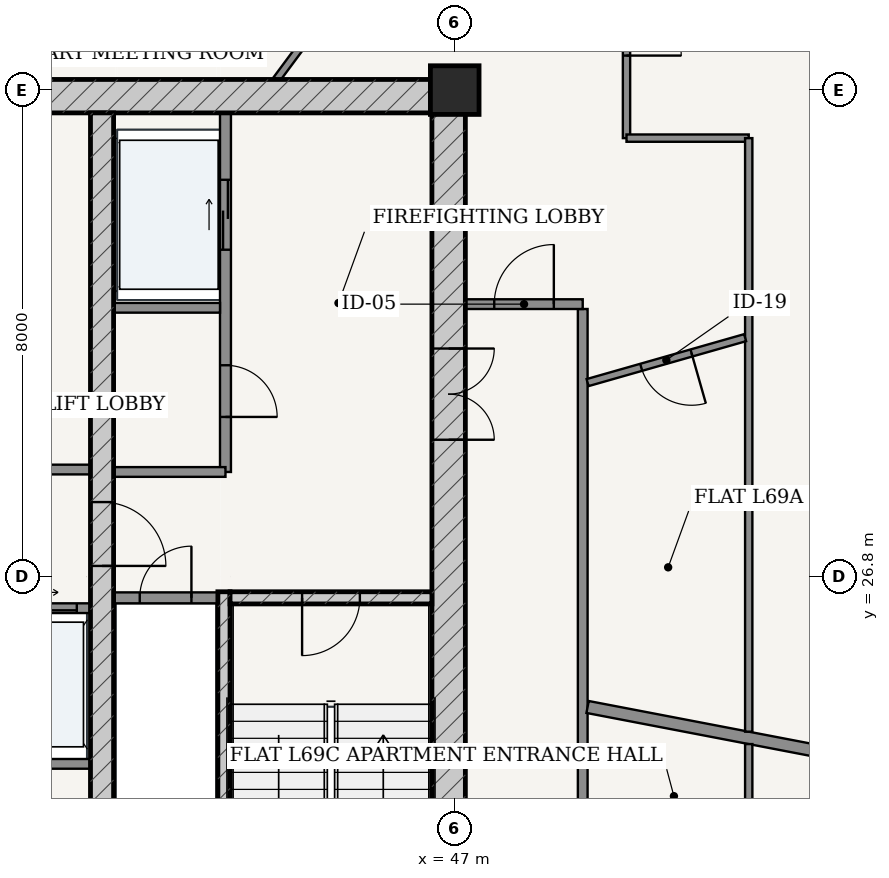
"""IFC4 building model, lengths in metres.
Left out: names, types, materials, properties, quantities, classifications, styles, units other than length and angle.
Written with IfcOpenShell. Run it as: python <this file> out.ifc"""

import sys

from ifc_helpers import new_model, si_unit, direction, frame, frame_2d, origin, origin_2d, place, context, subcontext, project, spatial, rectangle, extrude, source, transform, mapped, element, fill, save


model = new_model("IFC4")
c1 = context("Model", 3, precision=1e-05, world=origin(), true_north=direction((-0.2419218956, 0.970295726276)))
c2 = subcontext(c1, "Body", "Model", "MODEL_VIEW")
j1 = project(units=[si_unit("LENGTHUNIT", "METRE"), si_unit("PLANEANGLEUNIT", "RADIAN")], contexts=[c1])
p1 = place(None, origin())
s1 = spatial("IfcSite", under=j1, at=p1, CompositionType="ELEMENT")
p2 = place(p1, origin())
s2 = spatial("IfcBuilding", under=s1, at=p2, CompositionType="ELEMENT")
p3 = place(p2, frame((0.0, 0.0, 263.2)))
s3 = spatial("IfcBuildingStorey", under=s2, at=p3, CompositionType="ELEMENT", Elevation=263.2)
p4 = place(p3, frame((47.0, 34.8, 0.0), z_axis=(0.0, 0.0, 1.0), x_axis=(1.0, 0.0, 0.0)))
e1 = element("IfcColumn", 1, at=p4, inside=s3, PredefinedType="COLUMN", context=c2, shape_type="SweptSolid", body=[
    extrude(rectangle(XDim=0.8, YDim=0.8, at=origin_2d()), origin(), (0.0, 0.0, 1.0), 3.75),
])
p5 = place(p3, frame((28.825, 34.7, 0.0), z_axis=(0.0, 0.0, 1.0), x_axis=(1.0, 0.0, 0.0)))
e2 = element("IfcWall", 2, at=p5, inside=s3, PredefinedType="SHEAR", context=c2, shape_type="SweptSolid", body=[
    extrude(rectangle(XDim=18.35, YDim=0.55, at=frame_2d((9.175, 0.0))), origin(), (0.0, 0.0, 1.0), 3.49),
])
p6 = place(p3, frame((46.9, 19.175, 0.0), z_axis=(0.0, 0.0, 1.0), x_axis=(0.0, 1.0, 0.0)))
e3 = element("IfcWall", 3, at=p6, inside=s3, PredefinedType="SHEAR", context=c2, shape_type="SweptSolid", body=[
    extrude(rectangle(XDim=15.25, YDim=0.55, at=frame_2d((7.625, 0.0))), origin(), (0.0, 0.0, 1.0), 3.49),
])
p7 = place(p6, frame((9.875, 0.0, 0.0)))
e4 = element("IfcOpeningElement", 4, at=p7, cuts=e3, PredefinedType="OPENING", context=c2, shape_type="SweptSolid", body=[
    extrude(rectangle(XDim=1.5, YDim=2.2, at=frame_2d((0.75, 1.1))), frame((0.0, 0.285, 0.0), z_axis=(0.0, -1.0, 0.0), x_axis=(1.0, 0.0, 0.0)), (0.0, 0.0, 1.0), 0.57),
])
p8 = place(p3, frame((43.205, 19.175, 0.0), z_axis=(0.0, 0.0, 1.0), x_axis=(0.0, 1.0, 0.0)))
e5 = element("IfcWall", 5, at=p8, inside=s3, PredefinedType="SOLIDWALL", context=c2, shape_type="SweptSolid", body=[
    extrude(rectangle(XDim=7.375, YDim=0.2, at=frame_2d((3.688, 0.0))), origin(), (0.0, 0.0, 1.0), 3.49),
])
p9 = place(p3, frame((43.305, 26.45, 0.0), z_axis=(0.0, 0.0, 1.0), x_axis=(1.0, 0.0, 0.0)))
e6 = element("IfcWall", 6, at=p9, inside=s3, PredefinedType="SOLIDWALL", context=c2, shape_type="SweptSolid", body=[
    extrude(rectangle(XDim=3.32, YDim=0.2, at=frame_2d((1.66, 0.0))), origin(), (0.0, 0.0, 1.0), 3.49),
])
p10 = place(p9, frame((1.185, 0.0, 0.0)))
e7 = element("IfcOpeningElement", 7, at=p10, cuts=e6, PredefinedType="OPENING", context=c2, shape_type="SweptSolid", body=[
    extrude(rectangle(XDim=0.95, YDim=2.15, at=frame_2d((0.475, 1.075))), frame((0.0, 0.11, 0.0), z_axis=(0.0, -1.0, 0.0), x_axis=(1.0, 0.0, 0.0)), (0.0, 0.0, 1.0), 0.22),
])
p11 = place(p3, frame((41.2, 19.175, 0.0), z_axis=(0.0, 0.0, 1.0), x_axis=(0.0, 1.0, 0.0)))
e8 = element("IfcWall", 8, at=p11, inside=s3, PredefinedType="SHEAR", context=c2, shape_type="SweptSolid", body=[
    extrude(rectangle(XDim=15.25, YDim=0.38, at=frame_2d((7.625, 0.0))), origin(), (0.0, 0.0, 1.0), 3.49),
])
p12 = place(p11, frame((7.8, 0.0, 0.0)))
e9 = element("IfcOpeningElement", 9, at=p12, cuts=e8, PredefinedType="OPENING", context=c2, shape_type="SweptSolid", body=[
    extrude(rectangle(XDim=1.05, YDim=2.15, at=frame_2d((0.525, 1.075))), frame((0.0, 0.2, 0.0), z_axis=(0.0, -1.0, 0.0), x_axis=(1.0, 0.0, 0.0)), (0.0, 0.0, 1.0), 0.4),
])
p13 = place(p3, frame((41.39, 26.45, 0.0), z_axis=(0.0, 0.0, 1.0), x_axis=(1.0, 0.0, 0.0)))
e10 = element("IfcWall", 10, at=p13, inside=s3, PredefinedType="PARTITIONING", context=c2, shape_type="SweptSolid", body=[
    extrude(rectangle(XDim=1.71, YDim=0.18, at=frame_2d((0.855, 0.0))), origin(), (0.0, 0.0, 1.0), 3.49),
])
p14 = place(p13, frame((0.43, 0.0, 0.0)))
e11 = element("IfcOpeningElement", 11, at=p14, cuts=e10, PredefinedType="OPENING", context=c2, shape_type="SweptSolid", body=[
    extrude(rectangle(XDim=0.85, YDim=2.1, at=frame_2d((0.425, 1.05))), frame((0.0, 0.1, 0.0), z_axis=(0.0, -1.0, 0.0), x_axis=(1.0, 0.0, 0.0)), (0.0, 0.0, 1.0), 0.2),
])
p15 = place(p3, frame((43.23, 28.52, 0.0), z_axis=(0.0, 0.0, 1.0), x_axis=(0.0, 1.0, 0.0)))
e12 = element("IfcWall", 12, at=p15, inside=s3, PredefinedType="PARTITIONING", context=c2, shape_type="SweptSolid", body=[
    extrude(rectangle(XDim=5.905, YDim=0.18, at=frame_2d((2.953, 0.0))), origin(), (0.0, 0.0, 1.0), 3.49),
])
p16 = place(p15, frame((0.905, 0.0, 0.0)))
e13 = element("IfcOpeningElement", 13, at=p16, cuts=e12, PredefinedType="OPENING", context=c2, shape_type="SweptSolid", body=[
    extrude(rectangle(XDim=0.85, YDim=2.1, at=frame_2d((0.425, 1.05))), frame((0.0, 0.1, 0.0), z_axis=(0.0, -1.0, 0.0), x_axis=(1.0, 0.0, 0.0)), (0.0, 0.0, 1.0), 0.2),
])
p17 = place(p15, frame((3.655, 0.0, 0.0)))
e14 = element("IfcOpeningElement", 14, at=p17, cuts=e12, PredefinedType="OPENING", context=c2, shape_type="SweptSolid", body=[
    extrude(rectangle(XDim=1.15, YDim=2.2, at=frame_2d((0.575, 1.1))), frame((0.0, 0.1, 0.0), z_axis=(0.0, -1.0, 0.0), x_axis=(1.0, 0.0, 0.0)), (0.0, 0.0, 1.0), 0.2),
])
p18 = place(p3, frame((41.39, 31.22, 0.0), z_axis=(0.0, 0.0, 1.0), x_axis=(1.0, 0.0, 0.0)))
e15 = element("IfcWall", 15, at=p18, inside=s3, PredefinedType="PARTITIONING", context=c2, shape_type="SweptSolid", body=[
    extrude(rectangle(XDim=1.75, YDim=0.16, at=frame_2d((0.875, 0.0))), origin(), (0.0, 0.0, 1.0), 3.49),
])
p19 = place(p3, frame((41.39, 28.52, 0.0), z_axis=(0.0, 0.0, 1.0), x_axis=(1.0, 0.0, 0.0)))
e16 = element("IfcWall", 16, at=p19, inside=s3, PredefinedType="PARTITIONING", context=c2, shape_type="SweptSolid", body=[
    extrude(rectangle(XDim=1.84, YDim=0.16, at=frame_2d((0.92, 0.0))), origin(), (0.0, 0.0, 1.0), 3.49),
])
p20 = place(p3, frame((34.99, 28.56, 0.0), z_axis=(0.0, 0.0, 1.0), x_axis=(1.0, 0.0, 0.0)))
e17 = element("IfcWall", 17, at=p20, inside=s3, PredefinedType="PARTITIONING", context=c2, shape_type="SweptSolid", body=[
    extrude(rectangle(XDim=6.02, YDim=0.16, at=frame_2d((3.01, 0.0))), origin(), (0.0, 0.0, 1.0), 3.49),
])
p21 = place(p20, frame((2.585, 0.0, 0.0)))
e18 = element("IfcOpeningElement", 18, at=p21, cuts=e17, PredefinedType="OPENING", context=c2, shape_type="SweptSolid", body=[
    extrude(rectangle(XDim=0.85, YDim=2.1, at=frame_2d((0.425, 1.05))), frame((0.0, 0.09, 0.0), z_axis=(0.0, -1.0, 0.0), x_axis=(1.0, 0.0, 0.0)), (0.0, 0.0, 1.0), 0.18),
])
p22 = place(p3, frame((34.99, 26.28, 0.0), z_axis=(0.0, 0.0, 1.0), x_axis=(1.0, 0.0, 0.0)))
e19 = element("IfcWall", 19, at=p22, inside=s3, PredefinedType="PARTITIONING", context=c2, shape_type="SweptSolid", body=[
    extrude(rectangle(XDim=6.02, YDim=0.16, at=frame_2d((3.01, 0.0))), origin(), (0.0, 0.0, 1.0), 3.49),
])
p23 = place(p22, frame((1.045, 0.0, 0.0)))
e20 = element("IfcOpeningElement", 20, at=p23, cuts=e19, PredefinedType="OPENING", context=c2, shape_type="SweptSolid", body=[
    extrude(rectangle(XDim=0.85, YDim=2.1, at=frame_2d((0.425, 1.05))), frame((0.0, 0.09, 0.0), z_axis=(0.0, -1.0, 0.0), x_axis=(1.0, 0.0, 0.0)), (0.0, 0.0, 1.0), 0.18),
])
p24 = place(p22, frame((3.215, 0.0, 0.0)))
e21 = element("IfcOpeningElement", 21, at=p24, cuts=e19, PredefinedType="OPENING", context=c2, shape_type="SweptSolid", body=[
    extrude(rectangle(XDim=1.1, YDim=2.2, at=frame_2d((0.55, 1.1))), frame((0.0, 0.09, 0.0), z_axis=(0.0, -1.0, 0.0), x_axis=(1.0, 0.0, 0.0)), (0.0, 0.0, 1.0), 0.18),
])
p25 = place(p22, frame((4.695, 0.0, 0.0)))
e22 = element("IfcOpeningElement", 22, at=p25, cuts=e19, PredefinedType="OPENING", context=c2, shape_type="SweptSolid", body=[
    extrude(rectangle(XDim=1.1, YDim=2.2, at=frame_2d((0.55, 1.1))), frame((0.0, 0.09, 0.0), z_axis=(0.0, -1.0, 0.0), x_axis=(1.0, 0.0, 0.0)), (0.0, 0.0, 1.0), 0.18),
])
p26 = place(p3, frame((34.99, 23.72, 0.0), z_axis=(0.0, 0.0, 1.0), x_axis=(1.0, 0.0, 0.0)))
e23 = element("IfcWall", 23, at=p26, inside=s3, PredefinedType="PARTITIONING", context=c2, shape_type="SweptSolid", body=[
    extrude(rectangle(XDim=6.02, YDim=0.16, at=frame_2d((3.01, 0.0))), origin(), (0.0, 0.0, 1.0), 3.49),
])
p27 = place(p3, frame((49.105, 17.275, 0.0), z_axis=(0.0, 0.0, 1.0), x_axis=(0.0, 1.0, 0.0)))
e24 = element("IfcWall", 24, at=p27, inside=s3, PredefinedType="PARTITIONING", context=c2, shape_type="SweptSolid", body=[
    extrude(rectangle(XDim=13.925, YDim=0.16, at=frame_2d((6.962, 0.0))), origin(), (0.0, 0.0, 1.0), 3.015),
])
p28 = place(p27, frame((3.647, 0.0, 0.0)))
e25 = element("IfcOpeningElement", 25, at=p28, cuts=e24, PredefinedType="OPENING", context=c2, shape_type="SweptSolid", body=[
    extrude(rectangle(XDim=0.98, YDim=2.2, at=frame_2d((0.49, 1.1))), frame((0.0, 0.09, 0.0), z_axis=(0.0, -1.0, 0.0), x_axis=(1.0, 0.0, 0.0)), (0.0, 0.0, 1.0), 0.18),
])
p29 = place(p3, frame((47.175, 31.28, 0.0), z_axis=(0.0, 0.0, 1.0), x_axis=(1.0, 0.0, 0.0)))
e26 = element("IfcWall", 26, at=p29, inside=s3, PredefinedType="PARTITIONING", context=c2, shape_type="SweptSolid", body=[
    extrude(rectangle(XDim=1.93, YDim=0.16, at=frame_2d((0.965, 0.0))), origin(), (0.0, 0.0, 1.0), 3.49),
])
p30 = place(p29, frame((0.475, 0.0, 0.0)))
e27 = element("IfcOpeningElement", 27, at=p30, cuts=e26, PredefinedType="OPENING", context=c2, shape_type="SweptSolid", body=[
    extrude(rectangle(XDim=0.98, YDim=2.2, at=frame_2d((0.49, 1.1))), frame((0.0, 0.09, 0.0), z_axis=(0.0, -1.0, 0.0), x_axis=(1.0, 0.0, 0.0)), (0.0, 0.0, 1.0), 0.18),
])
p31 = place(p3, frame((49.185, 24.656, 0.0), z_axis=(0.0, 0.0, 1.0), x_axis=(0.982109889803, -0.188308694305, 0.0)))
e28 = element("IfcWall", 28, at=p31, inside=s3, PredefinedType="PARTITIONING", context=c2, shape_type="SweptSolid", body=[
    extrude(rectangle(XDim=7.884, YDim=0.2, at=frame_2d((3.942, 0.0))), origin(), (0.0, 0.0, 1.0), 3.015),
])
p32 = place(p3, frame((49.825, 37.625, 0.0), z_axis=(0.0, 0.0, 1.0), x_axis=(0.0, -1.0, 0.0)))
e29 = element("IfcWall", 29, at=p32, inside=s3, PredefinedType="PARTITIONING", context=c2, shape_type="SweptSolid", body=[
    extrude(rectangle(XDim=3.615, YDim=0.12, at=frame_2d((1.808, 0.0))), origin(), (0.0, 0.0, 1.0), 3.015),
])
p33 = place(p32, frame((1.357, 0.0, 0.0)))
e30 = element("IfcOpeningElement", 30, at=p33, cuts=e29, PredefinedType="OPENING", context=c2, shape_type="SweptSolid", body=[
    extrude(rectangle(XDim=0.9, YDim=2.15, at=frame_2d((0.45, 1.075))), frame((0.0, 0.07, 0.0), z_axis=(0.0, -1.0, 0.0), x_axis=(1.0, 0.0, 0.0)), (0.0, 0.0, 1.0), 0.14),
])
p34 = place(p3, frame((49.825, 34.01, 0.0), z_axis=(0.0, 0.0, 1.0), x_axis=(1.0, 0.0, 0.0)))
e31 = element("IfcWall", 31, at=p34, inside=s3, PredefinedType="PARTITIONING", context=c2, shape_type="SweptSolid", body=[
    extrude(rectangle(XDim=2.01, YDim=0.12, at=frame_2d((1.005, 0.0))), origin(), (0.0, 0.0, 1.0), 3.209),
])
p35 = place(p3, frame((51.835, 34.01, 0.0), z_axis=(0.0, 0.0, 1.0), x_axis=(0.0, -1.0, 0.0)))
e32 = element("IfcWall", 32, at=p35, inside=s3, PredefinedType="PARTITIONING", context=c2, shape_type="SweptSolid", body=[
    extrude(rectangle(XDim=9.761, YDim=0.12, at=frame_2d((4.88, 0.0))), origin(), (0.0, 0.0, 1.0), 3.015),
])
p36 = place(p3, frame((49.185, 29.99, 0.0), z_axis=(0.0, 0.0, 1.0), x_axis=(0.961653809431, 0.274266204273, 0.0)))
e33 = element("IfcWall", 33, at=p36, inside=s3, PredefinedType="PARTITIONING", context=c2, shape_type="SweptSolid", body=[
    extrude(rectangle(XDim=2.694, YDim=0.12, at=frame_2d((1.347, 0.0))), origin(), (0.0, 0.0, 1.0), 3.209),
])
p37 = place(p36, frame((0.917, 0.0, 0.0)))
e34 = element("IfcOpeningElement", 34, at=p37, cuts=e33, PredefinedType="OPENING", context=c2, shape_type="SweptSolid", body=[
    extrude(rectangle(XDim=0.86, YDim=2.15, at=frame_2d((0.43, 1.075))), frame((0.0, 0.07, 0.0), z_axis=(0.0, -1.0, 0.0), x_axis=(1.0, 0.0, 0.0)), (0.0, 0.0, 1.0), 0.14),
])
p38 = place(p3, frame((44.07, 34.977, 0.0), z_axis=(0.0, 0.0, 1.0), x_axis=(0.596033679783, 0.802959433947, 0.0)))
e35 = element("IfcWall", 35, at=p38, inside=s3, PredefinedType="PARTITIONING", context=c2, shape_type="SweptSolid", body=[
    extrude(rectangle(XDim=3.236, YDim=0.12, at=frame_2d((1.618, 0.0))), origin(), (0.0, 0.0, 1.0), 3.49),
])
p39 = place(p38, frame((1.168, 0.0, 0.0)))
e36 = element("IfcOpeningElement", 36, at=p39, cuts=e35, PredefinedType="OPENING", context=c2, shape_type="SweptSolid", body=[
    extrude(rectangle(XDim=0.9, YDim=2.15, at=frame_2d((0.45, 1.075))), frame((0.0, 0.07, 0.0), z_axis=(0.0, -1.0, 0.0), x_axis=(1.0, 0.0, 0.0)), (0.0, 0.0, 1.0), 0.14),
])
p40 = place(p3, frame((51.835, 24.045, 0.0), z_axis=(0.0, 0.0, 1.0), x_axis=(0.0, -1.0, 0.0)))
e37 = element("IfcWall", 37, at=p40, inside=s3, PredefinedType="PARTITIONING", context=c2, shape_type="SweptSolid", body=[
    extrude(rectangle(XDim=9.58, YDim=0.12, at=frame_2d((4.79, 0.0))), origin(), (0.0, 0.0, 1.0), 3.015),
])
p41 = place(p40, frame((2.771, 0.0, 0.0)))
e38 = element("IfcOpeningElement", 38, at=p41, cuts=e37, PredefinedType="OPENING", context=c2, shape_type="SweptSolid", body=[
    extrude(rectangle(XDim=0.9, YDim=2.15, at=frame_2d((0.45, 1.075))), frame((0.0, 0.07, 0.0), z_axis=(0.0, -1.0, 0.0), x_axis=(1.0, 0.0, 0.0)), (0.0, 0.0, 1.0), 0.14),
])
p42 = place(p40, frame((8.073, 0.0, 0.0)))
e39 = element("IfcOpeningElement", 39, at=p42, cuts=e37, PredefinedType="OPENING", context=c2, shape_type="SweptSolid", body=[
    extrude(rectangle(XDim=0.9, YDim=2.15, at=frame_2d((0.45, 1.075))), frame((0.0, 0.07, 0.0), z_axis=(0.0, -1.0, 0.0), x_axis=(1.0, 0.0, 0.0)), (0.0, 0.0, 1.0), 0.14),
])
m1 = source(origin(), c2, "Body", "SweptSolid", [
    extrude(rectangle(XDim=1.5, YDim=2.2, at=frame_2d((0.75, 1.1))), frame((0.0, 0.025, 0.0), z_axis=(0.0, -1.0, 0.0), x_axis=(1.0, 0.0, 0.0)), (0.0, 0.0, 1.0), 0.05),
])
p43 = place(p7, frame((1.5, 0.0, 0.0), z_axis=(0.0, 0.0, 1.0), x_axis=(-1.0, 0.0, 0.0)))
e40 = element("IfcDoor", 40, at=p43, inside=s3, OperationType="DOUBLE_DOOR_SINGLE_SWING", PredefinedType="DOOR", context=c2, shape_type="MappedRepresentation", body=[
    mapped(m1, transform((0.0, 0.0, 0.0), scale=1.0)),
])
fill(e4, e40)
m2 = source(origin(), c2, "Body", "SweptSolid", [
    extrude(rectangle(XDim=1.05, YDim=2.15, at=frame_2d((0.525, 1.075))), frame((0.0, 0.025, 0.0), z_axis=(0.0, -1.0, 0.0), x_axis=(1.0, 0.0, 0.0)), (0.0, 0.0, 1.0), 0.05),
])
p44 = place(p12, frame((1.05, 0.0, 0.0), z_axis=(0.0, 0.0, 1.0), x_axis=(-1.0, 0.0, 0.0)))
e41 = element("IfcDoor", 41, at=p44, inside=s3, OperationType="SINGLE_SWING_RIGHT", PredefinedType="DOOR", context=c2, shape_type="MappedRepresentation", body=[
    mapped(m2, transform((0.0, 0.0, 0.0), scale=1.0)),
])
fill(e9, e41)
m3 = source(origin(), c2, "Body", "SweptSolid", [
    extrude(rectangle(XDim=0.95, YDim=2.15, at=frame_2d((0.475, 1.075))), frame((0.0, 0.025, 0.0), z_axis=(0.0, -1.0, 0.0), x_axis=(1.0, 0.0, 0.0)), (0.0, 0.0, 1.0), 0.05),
])
p45 = place(p10, frame((0.95, 0.0, 0.0), z_axis=(0.0, 0.0, 1.0), x_axis=(-1.0, 0.0, 0.0)))
e42 = element("IfcDoor", 42, at=p45, inside=s3, OperationType="SINGLE_SWING_RIGHT", PredefinedType="DOOR", context=c2, shape_type="MappedRepresentation", body=[
    mapped(m3, transform((0.0, 0.0, 0.0), scale=1.0)),
])
fill(e7, e42)
m4 = source(origin(), c2, "Body", "SweptSolid", [
    extrude(rectangle(XDim=0.85, YDim=2.1, at=frame_2d((0.425, 1.05))), frame((0.0, 0.025, 0.0), z_axis=(0.0, -1.0, 0.0), x_axis=(1.0, 0.0, 0.0)), (0.0, 0.0, 1.0), 0.05),
])
p46 = place(p14, origin())
e43 = element("IfcDoor", 43, at=p46, inside=s3, OperationType="SINGLE_SWING_RIGHT", PredefinedType="DOOR", context=c2, shape_type="MappedRepresentation", body=[
    mapped(m4, transform((0.0, 0.0, 0.0), scale=1.0)),
])
fill(e11, e43)
p47 = place(p16, frame((0.85, 0.0, 0.0), z_axis=(0.0, 0.0, 1.0), x_axis=(-1.0, 0.0, 0.0)))
e44 = element("IfcDoor", 44, at=p47, inside=s3, OperationType="SINGLE_SWING_RIGHT", PredefinedType="DOOR", context=c2, shape_type="MappedRepresentation", body=[
    mapped(m4, transform((0.0, 0.0, 0.0), scale=1.0)),
])
fill(e13, e44)
m5 = source(origin(), c2, "Body", "SweptSolid", [
    extrude(rectangle(XDim=1.15, YDim=2.2, at=frame_2d((0.575, 1.1))), frame((0.0, 0.025, 0.0), z_axis=(0.0, -1.0, 0.0), x_axis=(1.0, 0.0, 0.0)), (0.0, 0.0, 1.0), 0.05),
])
p48 = place(p17, origin())
e45 = element("IfcDoor", 45, at=p48, inside=s3, OperationType="DOUBLE_DOOR_SLIDING", PredefinedType="DOOR", context=c2, shape_type="MappedRepresentation", body=[
    mapped(m5, transform((0.0, 0.0, 0.0), scale=1.0)),
])
fill(e14, e45)
m6 = source(origin(), c2, "Body", "SweptSolid", [
    extrude(rectangle(XDim=1.1, YDim=2.2, at=frame_2d((0.55, 1.1))), frame((0.0, 0.025, 0.0), z_axis=(0.0, -1.0, 0.0), x_axis=(1.0, 0.0, 0.0)), (0.0, 0.0, 1.0), 0.05),
])
p49 = place(p25, origin())
e46 = element("IfcDoor", 46, at=p49, inside=s3, OperationType="DOUBLE_DOOR_SLIDING", PredefinedType="DOOR", context=c2, shape_type="MappedRepresentation", body=[
    mapped(m6, transform((0.0, 0.0, 0.0), scale=1.0)),
])
fill(e22, e46)
m7 = source(origin(), c2, "Body", "SweptSolid", [
    extrude(rectangle(XDim=0.98, YDim=2.2, at=frame_2d((0.49, 1.1))), frame((0.0, 0.025, 0.0), z_axis=(0.0, -1.0, 0.0), x_axis=(1.0, 0.0, 0.0)), (0.0, 0.0, 1.0), 0.05),
])
p50 = place(p30, origin())
e47 = element("IfcDoor", 47, at=p50, inside=s3, OperationType="SINGLE_SWING_RIGHT", PredefinedType="DOOR", context=c2, shape_type="MappedRepresentation", body=[
    mapped(m7, transform((0.0, 0.0, 0.0), scale=1.0)),
])
fill(e27, e47)
m8 = source(origin(), c2, "Body", "SweptSolid", [
    extrude(rectangle(XDim=0.86, YDim=2.15, at=frame_2d((0.43, 1.075))), frame((0.0, 0.025, 0.0), z_axis=(0.0, -1.0, 0.0), x_axis=(1.0, 0.0, 0.0)), (0.0, 0.0, 1.0), 0.05),
])
p51 = place(p37, frame((0.86, 0.0, 0.0), z_axis=(0.0, 0.0, 1.0), x_axis=(-1.0, 0.0, 0.0)))
e48 = element("IfcDoor", 48, at=p51, inside=s3, OperationType="SINGLE_SWING_LEFT", PredefinedType="DOOR", context=c2, shape_type="MappedRepresentation", body=[
    mapped(m8, transform((0.0, 0.0, 0.0), scale=1.0)),
])
fill(e34, e48)
m9 = source(origin(), c2, "Body", "SweptSolid", [
    extrude(rectangle(XDim=0.9, YDim=2.15, at=frame_2d((0.45, 1.075))), frame((0.0, 0.025, 0.0), z_axis=(0.0, -1.0, 0.0), x_axis=(1.0, 0.0, 0.0)), (0.0, 0.0, 1.0), 0.05),
])
p52 = place(p33, origin())
e49 = element("IfcDoor", 49, at=p52, inside=s3, OperationType="SINGLE_SWING_RIGHT", PredefinedType="DOOR", context=c2, shape_type="MappedRepresentation", body=[
    mapped(m9, transform((0.0, 0.0, 0.0), scale=1.0)),
])
fill(e30, e49)
save(model, sys.argv[1])
